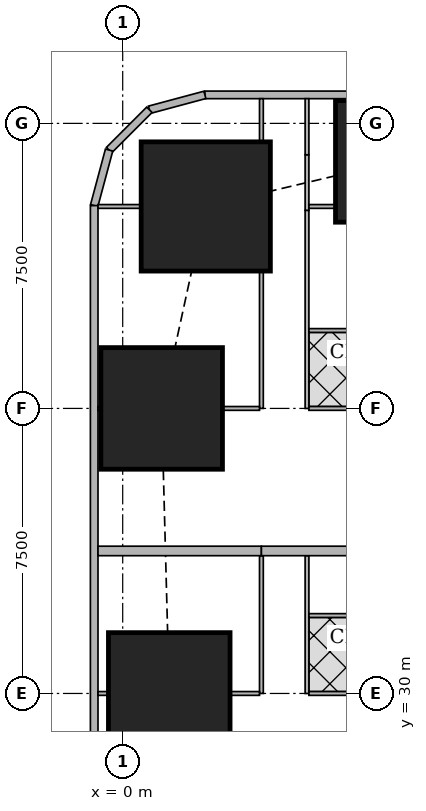
"""IFC4 building model, lengths in metres.
Left out: names, types, materials, properties, quantities, classifications, styles, units other than length and angle.
Written with IfcOpenShell. Run it as: python <this file> out.ifc"""

import sys

from ifc_helpers import new_model, si_unit, direction, frame, frame_2d, origin, origin_2d, place, context, subcontext, project, spatial, rectangle, extrude, element, fill, save


model = new_model("IFC4")
c1 = context("Model", 3, precision=1e-05, world=origin(), true_north=direction((0.0, 1.0)))
c2 = subcontext(c1, "Body", "Model", "MODEL_VIEW")
j1 = project(units=[si_unit("LENGTHUNIT", "METRE"), si_unit("PLANEANGLEUNIT", "RADIAN")], contexts=[c1])
p1 = place(None, origin())
s1 = spatial("IfcSite", under=j1, at=p1, CompositionType="ELEMENT")
p2 = place(p1, origin())
s2 = spatial("IfcBuilding", under=s1, at=p2, CompositionType="ELEMENT")
p3 = place(p2, frame((0.0, 0.0, 20.0)))
s3 = spatial("IfcBuildingStorey", under=s2, at=p3, CompositionType="ELEMENT", Elevation=20.0)
p4 = place(p3, frame((1.225, 30.0, 0.0), z_axis=(0.0, 0.0, 1.0), x_axis=(1.0, 0.0, 0.0)))
e1 = element("IfcColumn", 1, at=p4, inside=s3, PredefinedType="COLUMN", context=c2, shape_type="SweptSolid", body=[
    extrude(rectangle(XDim=3.2, YDim=3.2, at=origin_2d()), origin(), (0.0, 0.0, 1.0), 3.75),
])
p5 = place(p3, frame((1.025, 37.5, -0.3), z_axis=(0.0, 0.0, 1.0), x_axis=(1.0, 0.0, 0.0)))
e2 = element("IfcColumn", 2, at=p5, inside=s3, PredefinedType="COLUMN", context=c2, shape_type="SweptSolid", body=[
    extrude(rectangle(XDim=3.2, YDim=3.2, at=origin_2d()), origin(), (0.0, 0.0, 1.0), 4.05),
])
p6 = place(p3, frame((2.186, 42.814, 0.0), z_axis=(0.0, 0.0, 1.0), x_axis=(1.0, 0.0, 0.0)))
e3 = element("IfcColumn", 3, at=p6, inside=s3, PredefinedType="COLUMN", context=c2, shape_type="SweptSolid", body=[
    extrude(rectangle(XDim=3.4, YDim=3.4, at=origin_2d()), origin(), (0.0, 0.0, 1.0), 3.75),
])
p7 = place(p3, frame((7.2, 44.0, -0.3), z_axis=(0.0, 0.0, 1.0), x_axis=(1.0, 0.0, 0.0)))
e4 = element("IfcColumn", 4, at=p7, inside=s3, PredefinedType="COLUMN", context=c2, shape_type="SweptSolid", body=[
    extrude(rectangle(XDim=3.2, YDim=3.2, at=origin_2d()), origin(), (0.0, 0.0, 1.0), 4.05),
])
p8 = place(p3, frame((40.106, 45.75, 0.0), z_axis=(0.0, 0.0, 1.0), x_axis=(-1.0, 0.0, 0.0)))
e5 = element("IfcWall", 5, at=p8, inside=s3, PredefinedType="SOLIDWALL", context=c2, shape_type="SweptSolid", body=[
    extrude(rectangle(XDim=37.943, YDim=0.2, at=frame_2d((18.971, 0.0))), origin(), (0.0, 0.0, 1.0), 3.5),
])
p9 = place(p8, frame((8.606, 0.0, 0.9)))
e6 = element("IfcOpeningElement", 6, at=p9, cuts=e5, PredefinedType="OPENING", context=c2, shape_type="SweptSolid", body=[
    extrude(rectangle(XDim=1.8, YDim=1.5, at=frame_2d((0.9, 0.75))), frame((0.0, 0.11, 0.0), z_axis=(0.0, -1.0, 0.0), x_axis=(1.0, 0.0, 0.0)), (0.0, 0.0, 1.0), 0.22),
])
p10 = place(p8, frame((12.206, 0.0, 0.9)))
e7 = element("IfcOpeningElement", 7, at=p10, cuts=e5, PredefinedType="OPENING", context=c2, shape_type="SweptSolid", body=[
    extrude(rectangle(XDim=1.8, YDim=1.5, at=frame_2d((0.9, 0.75))), frame((0.0, 0.11, 0.0), z_axis=(0.0, -1.0, 0.0), x_axis=(1.0, 0.0, 0.0)), (0.0, 0.0, 1.0), 0.22),
])
p11 = place(p8, frame((15.806, 0.0, 0.9)))
e8 = element("IfcOpeningElement", 8, at=p11, cuts=e5, PredefinedType="OPENING", context=c2, shape_type="SweptSolid", body=[
    extrude(rectangle(XDim=1.8, YDim=1.5, at=frame_2d((0.9, 0.75))), frame((0.0, 0.11, 0.0), z_axis=(0.0, -1.0, 0.0), x_axis=(1.0, 0.0, 0.0)), (0.0, 0.0, 1.0), 0.22),
])
p12 = place(p8, frame((19.406, 0.0, 0.9)))
e9 = element("IfcOpeningElement", 9, at=p12, cuts=e5, PredefinedType="OPENING", context=c2, shape_type="SweptSolid", body=[
    extrude(rectangle(XDim=1.8, YDim=1.5, at=frame_2d((0.9, 0.75))), frame((0.0, 0.11, 0.0), z_axis=(0.0, -1.0, 0.0), x_axis=(1.0, 0.0, 0.0)), (0.0, 0.0, 1.0), 0.22),
])
p13 = place(p8, frame((23.006, 0.0, 0.9)))
e10 = element("IfcOpeningElement", 10, at=p13, cuts=e5, PredefinedType="OPENING", context=c2, shape_type="SweptSolid", body=[
    extrude(rectangle(XDim=1.8, YDim=1.5, at=frame_2d((0.9, 0.75))), frame((0.0, 0.11, 0.0), z_axis=(0.0, -1.0, 0.0), x_axis=(1.0, 0.0, 0.0)), (0.0, 0.0, 1.0), 0.22),
])
p14 = place(p8, frame((26.606, 0.0, 0.9)))
e11 = element("IfcOpeningElement", 11, at=p14, cuts=e5, PredefinedType="OPENING", context=c2, shape_type="SweptSolid", body=[
    extrude(rectangle(XDim=1.8, YDim=1.5, at=frame_2d((0.9, 0.75))), frame((0.0, 0.11, 0.0), z_axis=(0.0, -1.0, 0.0), x_axis=(1.0, 0.0, 0.0)), (0.0, 0.0, 1.0), 0.22),
])
p15 = place(p3, frame((2.163, 45.75, 0.0), z_axis=(0.0, 0.0, 1.0), x_axis=(-0.965832000415, -0.259168954497, 0.0)))
e12 = element("IfcWall", 12, at=p15, inside=s3, PredefinedType="SOLIDWALL", context=c2, shape_type="SweptSolid", body=[
    extrude(rectangle(XDim=1.513, YDim=0.2, at=frame_2d((0.756, 0.0))), origin(), (0.0, 0.0, 1.0), 3.5),
])
p16 = place(p3, frame((0.702, 45.358, 0.0), z_axis=(0.0, 0.0, 1.0), x_axis=(-0.707106781187, -0.707106781187, 0.0)))
e13 = element("IfcWall", 13, at=p16, inside=s3, PredefinedType="SOLIDWALL", context=c2, shape_type="SweptSolid", body=[
    extrude(rectangle(XDim=1.499, YDim=0.2, at=frame_2d((0.75, 0.0))), origin(), (0.0, 0.0, 1.0), 3.5),
])
p17 = place(p3, frame((-0.358, 44.298, 0.0), z_axis=(0.0, 0.0, 1.0), x_axis=(-0.259168954497, -0.965832000415, 0.0)))
e14 = element("IfcWall", 14, at=p17, inside=s3, PredefinedType="SOLIDWALL", context=c2, shape_type="SweptSolid", body=[
    extrude(rectangle(XDim=1.513, YDim=0.2, at=frame_2d((0.756, 0.0))), origin(), (0.0, 0.0, 1.0), 3.5),
])
p18 = place(p3, frame((-0.75, 42.837, 0.0), z_axis=(0.0, 0.0, 1.0), x_axis=(0.0, -1.0, 0.0)))
e15 = element("IfcWall", 15, at=p18, inside=s3, PredefinedType="SOLIDWALL", context=c2, shape_type="SweptSolid", body=[
    extrude(rectangle(XDim=40.674, YDim=0.2, at=frame_2d((20.337, 0.0))), origin(), (0.0, 0.0, 1.0), 3.5),
])
p19 = place(p18, frame((1.78, 0.0, 0.9)))
e16 = element("IfcOpeningElement", 16, at=p19, cuts=e15, PredefinedType="OPENING", context=c2, shape_type="SweptSolid", body=[
    extrude(rectangle(XDim=1.8, YDim=1.5, at=frame_2d((0.9, 0.75))), frame((0.0, 0.11, 0.0), z_axis=(0.0, -1.0, 0.0), x_axis=(1.0, 0.0, 0.0)), (0.0, 0.0, 1.0), 0.22),
])
p20 = place(p18, frame((6.312, 0.0, 0.9)))
e17 = element("IfcOpeningElement", 17, at=p20, cuts=e15, PredefinedType="OPENING", context=c2, shape_type="SweptSolid", body=[
    extrude(rectangle(XDim=1.8, YDim=1.5, at=frame_2d((0.9, 0.75))), frame((0.0, 0.11, 0.0), z_axis=(0.0, -1.0, 0.0), x_axis=(1.0, 0.0, 0.0)), (0.0, 0.0, 1.0), 0.22),
])
p21 = place(p18, frame((10.062, 0.0, 0.9)))
e18 = element("IfcOpeningElement", 18, at=p21, cuts=e15, PredefinedType="OPENING", context=c2, shape_type="SweptSolid", body=[
    extrude(rectangle(XDim=1.8, YDim=1.5, at=frame_2d((0.9, 0.75))), frame((0.0, 0.11, 0.0), z_axis=(0.0, -1.0, 0.0), x_axis=(1.0, 0.0, 0.0)), (0.0, 0.0, 1.0), 0.22),
])
p22 = place(p18, frame((13.812, 0.0, 0.9)))
e19 = element("IfcOpeningElement", 19, at=p22, cuts=e15, PredefinedType="OPENING", context=c2, shape_type="SweptSolid", body=[
    extrude(rectangle(XDim=1.8, YDim=1.5, at=frame_2d((0.9, 0.75))), frame((0.0, 0.11, 0.0), z_axis=(0.0, -1.0, 0.0), x_axis=(1.0, 0.0, 0.0)), (0.0, 0.0, 1.0), 0.22),
])
p23 = place(p18, frame((17.562, 0.0, 0.9)))
e20 = element("IfcOpeningElement", 20, at=p23, cuts=e15, PredefinedType="OPENING", context=c2, shape_type="SweptSolid", body=[
    extrude(rectangle(XDim=1.8, YDim=1.5, at=frame_2d((0.9, 0.75))), frame((0.0, 0.11, 0.0), z_axis=(0.0, -1.0, 0.0), x_axis=(1.0, 0.0, 0.0)), (0.0, 0.0, 1.0), 0.22),
])
p24 = place(p18, frame((21.312, 0.0, 0.9)))
e21 = element("IfcOpeningElement", 21, at=p24, cuts=e15, PredefinedType="OPENING", context=c2, shape_type="SweptSolid", body=[
    extrude(rectangle(XDim=1.8, YDim=1.5, at=frame_2d((0.9, 0.75))), frame((0.0, 0.11, 0.0), z_axis=(0.0, -1.0, 0.0), x_axis=(1.0, 0.0, 0.0)), (0.0, 0.0, 1.0), 0.22),
])
p25 = place(p18, frame((25.062, 0.0, 0.9)))
e22 = element("IfcOpeningElement", 22, at=p25, cuts=e15, PredefinedType="OPENING", context=c2, shape_type="SweptSolid", body=[
    extrude(rectangle(XDim=1.8, YDim=1.5, at=frame_2d((0.9, 0.75))), frame((0.0, 0.11, 0.0), z_axis=(0.0, -1.0, 0.0), x_axis=(1.0, 0.0, 0.0)), (0.0, 0.0, 1.0), 0.22),
])
p26 = place(p18, frame((28.812, 0.0, 0.9)))
e23 = element("IfcOpeningElement", 23, at=p26, cuts=e15, PredefinedType="OPENING", context=c2, shape_type="SweptSolid", body=[
    extrude(rectangle(XDim=1.8, YDim=1.5, at=frame_2d((0.9, 0.75))), frame((0.0, 0.11, 0.0), z_axis=(0.0, -1.0, 0.0), x_axis=(1.0, 0.0, 0.0)), (0.0, 0.0, 1.0), 0.22),
])
p27 = place(p18, frame((32.562, 0.0, 0.9)))
e24 = element("IfcOpeningElement", 24, at=p27, cuts=e15, PredefinedType="OPENING", context=c2, shape_type="SweptSolid", body=[
    extrude(rectangle(XDim=1.8, YDim=1.5, at=frame_2d((0.9, 0.75))), frame((0.0, 0.11, 0.0), z_axis=(0.0, -1.0, 0.0), x_axis=(1.0, 0.0, 0.0)), (0.0, 0.0, 1.0), 0.22),
])
p28 = place(p18, frame((37.094, 0.0, 0.9)))
e25 = element("IfcOpeningElement", 25, at=p28, cuts=e15, PredefinedType="OPENING", context=c2, shape_type="SweptSolid", body=[
    extrude(rectangle(XDim=1.8, YDim=1.5, at=frame_2d((0.9, 0.75))), frame((0.0, 0.11, 0.0), z_axis=(0.0, -1.0, 0.0), x_axis=(1.0, 0.0, 0.0)), (0.0, 0.0, 1.0), 0.22),
])
p29 = place(p3, frame((3.65, 30.0, 0.0), z_axis=(0.0, 0.0, 1.0), x_axis=(0.0, 1.0, 0.0)))
e26 = element("IfcWall", 26, at=p29, inside=s3, PredefinedType="PARTITIONING", context=c2, shape_type="SweptSolid", body=[
    extrude(rectangle(XDim=3.625, YDim=0.1, at=frame_2d((1.812, 0.0))), origin(), (0.0, 0.0, 1.0), 3.5),
])
p30 = place(p29, frame((1.65, 0.0, 0.0)))
e27 = element("IfcOpeningElement", 27, at=p30, cuts=e26, PredefinedType="OPENING", context=c2, shape_type="SweptSolid", body=[
    extrude(rectangle(XDim=0.9, YDim=2.1, at=frame_2d((0.45, 1.05))), frame((0.0, 0.06, 0.0), z_axis=(0.0, -1.0, 0.0), x_axis=(1.0, 0.0, 0.0)), (0.0, 0.0, 1.0), 0.12),
])
p31 = place(p3, frame((4.85, 30.0, 0.0), z_axis=(0.0, 0.0, 1.0), x_axis=(0.0, 1.0, 0.0)))
e28 = element("IfcWall", 28, at=p31, inside=s3, PredefinedType="PARTITIONING", context=c2, shape_type="SweptSolid", body=[
    extrude(rectangle(XDim=3.625, YDim=0.1, at=frame_2d((1.812, 0.0))), origin(), (0.0, 0.0, 1.0), 3.5),
])
p32 = place(p31, frame((0.575, 0.0, 0.0)))
e29 = element("IfcOpeningElement", 29, at=p32, cuts=e28, PredefinedType="OPENING", context=c2, shape_type="SweptSolid", body=[
    extrude(rectangle(XDim=0.9, YDim=2.1, at=frame_2d((0.45, 1.05))), frame((0.0, 0.06, 0.0), z_axis=(0.0, -1.0, 0.0), x_axis=(1.0, 0.0, 0.0)), (0.0, 0.0, 1.0), 0.12),
])
p33 = place(p31, frame((2.45, 0.0, 0.0)))
e30 = element("IfcOpeningElement", 30, at=p33, cuts=e28, PredefinedType="OPENING", context=c2, shape_type="SweptSolid", body=[
    extrude(rectangle(XDim=0.9, YDim=2.1, at=frame_2d((0.45, 1.05))), frame((0.0, 0.06, 0.0), z_axis=(0.0, -1.0, 0.0), x_axis=(1.0, 0.0, 0.0)), (0.0, 0.0, 1.0), 0.12),
])
p34 = place(p3, frame((-0.65, 30.0, 0.0), z_axis=(0.0, 0.0, 1.0), x_axis=(1.0, 0.0, 0.0)))
e31 = element("IfcWall", 31, at=p34, inside=s3, PredefinedType="PARTITIONING", context=c2, shape_type="SweptSolid", body=[
    extrude(rectangle(XDim=0.274, YDim=0.1, at=frame_2d((0.137, 0.0))), origin(), (0.0, 0.0, 1.0), 3.5),
])
p35 = place(p3, frame((2.826, 30.0, 0.0), z_axis=(0.0, 0.0, 1.0), x_axis=(1.0, 0.0, 0.0)))
e32 = element("IfcWall", 32, at=p35, inside=s3, PredefinedType="PARTITIONING", context=c2, shape_type="SweptSolid", body=[
    extrude(rectangle(XDim=0.774, YDim=0.1, at=frame_2d((0.387, 0.0))), origin(), (0.0, 0.0, 1.0), 3.5),
])
p36 = place(p3, frame((4.9, 30.0, 0.0), z_axis=(0.0, 0.0, 1.0), x_axis=(1.0, 0.0, 0.0)))
e33 = element("IfcWall", 33, at=p36, inside=s3, PredefinedType="PARTITIONING", context=c2, shape_type="SweptSolid", body=[
    extrude(rectangle(XDim=1.399, YDim=0.1, at=frame_2d((0.7, 0.0))), origin(), (0.0, 0.0, 1.0), 3.5),
])
p37 = place(p3, frame((4.9, 32.05, 0.0), z_axis=(0.0, 0.0, 1.0), x_axis=(1.0, 0.0, 0.0)))
e34 = element("IfcWall", 34, at=p37, inside=s3, PredefinedType="PARTITIONING", context=c2, shape_type="SweptSolid", body=[
    extrude(rectangle(XDim=3.525, YDim=0.1, at=frame_2d((1.763, 0.0))), origin(), (0.0, 0.0, 1.0), 3.5),
])
p38 = place(p3, frame((3.65, 37.5, 0.0), z_axis=(0.0, 0.0, 1.0), x_axis=(0.0, 1.0, 0.0)))
e35 = element("IfcWall", 35, at=p38, inside=s3, PredefinedType="PARTITIONING", context=c2, shape_type="SweptSolid", body=[
    extrude(rectangle(XDim=3.613, YDim=0.1, at=frame_2d((1.807, 0.0))), origin(), (0.0, 0.0, 1.0), 3.5),
])
p39 = place(p38, frame((1.65, 0.0, 0.0)))
e36 = element("IfcOpeningElement", 36, at=p39, cuts=e35, PredefinedType="OPENING", context=c2, shape_type="SweptSolid", body=[
    extrude(rectangle(XDim=0.9, YDim=2.1, at=frame_2d((0.45, 1.05))), frame((0.0, 0.06, 0.0), z_axis=(0.0, -1.0, 0.0), x_axis=(1.0, 0.0, 0.0)), (0.0, 0.0, 1.0), 0.12),
])
p40 = place(p3, frame((3.65, 44.515, 0.0), z_axis=(0.0, 0.0, 1.0), x_axis=(0.0, 1.0, 0.0)))
e37 = element("IfcWall", 37, at=p40, inside=s3, PredefinedType="PARTITIONING", context=c2, shape_type="SweptSolid", body=[
    extrude(rectangle(XDim=1.135, YDim=0.1, at=frame_2d((0.567, 0.0))), origin(), (0.0, 0.0, 1.0), 3.5),
])
p41 = place(p3, frame((4.85, 37.5, 0.0), z_axis=(0.0, 0.0, 1.0), x_axis=(0.0, 1.0, 0.0)))
e38 = element("IfcWall", 38, at=p41, inside=s3, PredefinedType="PARTITIONING", context=c2, shape_type="SweptSolid", body=[
    extrude(rectangle(XDim=5.213, YDim=0.1, at=frame_2d((2.606, 0.0))), origin(), (0.0, 0.0, 1.0), 3.5),
])
p42 = place(p41, frame((0.575, 0.0, 0.0)))
e39 = element("IfcOpeningElement", 39, at=p42, cuts=e38, PredefinedType="OPENING", context=c2, shape_type="SweptSolid", body=[
    extrude(rectangle(XDim=0.9, YDim=2.1, at=frame_2d((0.45, 1.05))), frame((0.0, 0.06, 0.0), z_axis=(0.0, -1.0, 0.0), x_axis=(1.0, 0.0, 0.0)), (0.0, 0.0, 1.0), 0.12),
])
p43 = place(p41, frame((2.85, 0.0, 0.0)))
e40 = element("IfcOpeningElement", 40, at=p43, cuts=e38, PredefinedType="OPENING", context=c2, shape_type="SweptSolid", body=[
    extrude(rectangle(XDim=0.9, YDim=2.1, at=frame_2d((0.45, 1.05))), frame((0.0, 0.06, 0.0), z_axis=(0.0, -1.0, 0.0), x_axis=(1.0, 0.0, 0.0)), (0.0, 0.0, 1.0), 0.12),
])
p44 = place(p3, frame((4.85, 42.713, 0.0), z_axis=(0.0, 0.0, 1.0), x_axis=(0.0, 1.0, 0.0)))
e41 = element("IfcWall", 41, at=p44, inside=s3, PredefinedType="PARTITIONING", context=c2, shape_type="SweptSolid", body=[
    extrude(rectangle(XDim=1.462, YDim=0.1, at=frame_2d((0.731, 0.0))), origin(), (0.0, 0.0, 1.0), 2.1),
])
p45 = place(p3, frame((4.85, 44.175, 0.0), z_axis=(0.0, 0.0, 1.0), x_axis=(0.0, 1.0, 0.0)))
e42 = element("IfcWall", 42, at=p45, inside=s3, PredefinedType="PARTITIONING", context=c2, shape_type="SweptSolid", body=[
    extrude(rectangle(XDim=1.475, YDim=0.1, at=frame_2d((0.737, 0.0))), origin(), (0.0, 0.0, 1.0), 3.5),
])
p46 = place(p3, frame((-0.65, 37.5, 0.0), z_axis=(0.0, 0.0, 1.0), x_axis=(1.0, 0.0, 0.0)))
e43 = element("IfcWall", 43, at=p46, inside=s3, PredefinedType="PARTITIONING", context=c2, shape_type="SweptSolid", body=[
    extrude(rectangle(XDim=0.074, YDim=0.1, at=frame_2d((0.037, 0.0))), origin(), (0.0, 0.0, 1.0), 3.5),
])
p47 = place(p3, frame((2.626, 37.5, 0.0), z_axis=(0.0, 0.0, 1.0), x_axis=(1.0, 0.0, 0.0)))
e44 = element("IfcWall", 44, at=p47, inside=s3, PredefinedType="PARTITIONING", context=c2, shape_type="SweptSolid", body=[
    extrude(rectangle(XDim=0.974, YDim=0.1, at=frame_2d((0.487, 0.0))), origin(), (0.0, 0.0, 1.0), 3.5),
])
p48 = place(p3, frame((-0.65, 42.814, 0.0), z_axis=(0.0, 0.0, 1.0), x_axis=(1.0, 0.0, 0.0)))
e45 = element("IfcWall", 45, at=p48, inside=s3, PredefinedType="PARTITIONING", context=c2, shape_type="SweptSolid", body=[
    extrude(rectangle(XDim=1.135, YDim=0.1, at=frame_2d((0.567, 0.0))), origin(), (0.0, 0.0, 1.0), 3.5),
])
p49 = place(p3, frame((4.9, 37.5, 0.0), z_axis=(0.0, 0.0, 1.0), x_axis=(1.0, 0.0, 0.0)))
e46 = element("IfcWall", 46, at=p49, inside=s3, PredefinedType="PARTITIONING", context=c2, shape_type="SweptSolid", body=[
    extrude(rectangle(XDim=1.399, YDim=0.1, at=frame_2d((0.7, 0.0))), origin(), (0.0, 0.0, 1.0), 3.5),
])
p50 = place(p3, frame((4.9, 42.814, 0.0), z_axis=(0.0, 0.0, 1.0), x_axis=(1.0, 0.0, 0.0)))
e47 = element("IfcWall", 47, at=p50, inside=s3, PredefinedType="PARTITIONING", context=c2, shape_type="SweptSolid", body=[
    extrude(rectangle(XDim=0.699, YDim=0.1, at=frame_2d((0.35, 0.0))), origin(), (0.0, 0.0, 1.0), 2.1),
])
p51 = place(p3, frame((4.9, 39.55, 0.0), z_axis=(0.0, 0.0, 1.0), x_axis=(1.0, 0.0, 0.0)))
e48 = element("IfcWall", 48, at=p51, inside=s3, PredefinedType="PARTITIONING", context=c2, shape_type="SweptSolid", body=[
    extrude(rectangle(XDim=3.525, YDim=0.1, at=frame_2d((1.763, 0.0))), origin(), (0.0, 0.0, 1.0), 3.5),
])
p52 = place(p3, frame((-0.65, 33.75, 0.0), z_axis=(0.0, 0.0, 1.0), x_axis=(1.0, 0.0, 0.0)))
e49 = element("IfcWall", 49, at=p52, inside=s3, PredefinedType="SOLIDWALL", context=c2, shape_type="SweptSolid", body=[
    extrude(rectangle(XDim=4.3, YDim=0.25, at=frame_2d((2.15, 0.0))), origin(), (0.0, 0.0, 1.0), 2.05),
])
p53 = place(p3, frame((3.65, 33.75, 0.0), z_axis=(0.0, 0.0, 1.0), x_axis=(1.0, 0.0, 0.0)))
e50 = element("IfcWall", 50, at=p53, inside=s3, PredefinedType="SOLIDWALL", context=c2, shape_type="SweptSolid", body=[
    extrude(rectangle(XDim=4.775, YDim=0.25, at=frame_2d((2.388, 0.0))), origin(), (0.0, 0.0, 1.0), 3.5),
])
p54 = place(p19, origin())
e51 = element("IfcWindow", 51, at=p54, inside=s3, PartitioningType="SINGLE_PANEL", PredefinedType="WINDOW", context=c2, shape_type="SweptSolid", body=[
    extrude(rectangle(XDim=1.8, YDim=1.5, at=frame_2d((0.9, 0.75))), frame((0.0, 0.03, 0.0), z_axis=(0.0, -1.0, 0.0), x_axis=(1.0, 0.0, 0.0)), (0.0, 0.0, 1.0), 0.06),
])
fill(e16, e51)
p55 = place(p20, origin())
e52 = element("IfcWindow", 52, at=p55, inside=s3, PartitioningType="SINGLE_PANEL", PredefinedType="WINDOW", context=c2, shape_type="SweptSolid", body=[
    extrude(rectangle(XDim=1.8, YDim=1.5, at=frame_2d((0.9, 0.75))), frame((0.0, 0.03, 0.0), z_axis=(0.0, -1.0, 0.0), x_axis=(1.0, 0.0, 0.0)), (0.0, 0.0, 1.0), 0.06),
])
fill(e17, e52)
p56 = place(p21, origin())
e53 = element("IfcWindow", 53, at=p56, inside=s3, PartitioningType="SINGLE_PANEL", PredefinedType="WINDOW", context=c2, shape_type="SweptSolid", body=[
    extrude(rectangle(XDim=1.8, YDim=1.5, at=frame_2d((0.9, 0.75))), frame((0.0, 0.03, 0.0), z_axis=(0.0, -1.0, 0.0), x_axis=(1.0, 0.0, 0.0)), (0.0, 0.0, 1.0), 0.06),
])
fill(e18, e53)
p57 = place(p22, origin())
e54 = element("IfcWindow", 54, at=p57, inside=s3, PartitioningType="SINGLE_PANEL", PredefinedType="WINDOW", context=c2, shape_type="SweptSolid", body=[
    extrude(rectangle(XDim=1.8, YDim=1.5, at=frame_2d((0.9, 0.75))), frame((0.0, 0.03, 0.0), z_axis=(0.0, -1.0, 0.0), x_axis=(1.0, 0.0, 0.0)), (0.0, 0.0, 1.0), 0.06),
])
fill(e19, e54)
p58 = place(p30, origin())
e55 = element("IfcDoor", 55, at=p58, inside=s3, OperationType="SINGLE_SWING_RIGHT", PredefinedType="DOOR", context=c2, shape_type="SweptSolid", body=[
    extrude(rectangle(XDim=0.9, YDim=2.1, at=frame_2d((0.45, 1.05))), frame((0.0, 0.025, 0.0), z_axis=(0.0, -1.0, 0.0), x_axis=(1.0, 0.0, 0.0)), (0.0, 0.0, 1.0), 0.05),
])
fill(e27, e55)
p59 = place(p32, origin())
e56 = element("IfcDoor", 56, at=p59, inside=s3, OperationType="SINGLE_SWING_RIGHT", PredefinedType="DOOR", context=c2, shape_type="SweptSolid", body=[
    extrude(rectangle(XDim=0.9, YDim=2.1, at=frame_2d((0.45, 1.05))), frame((0.0, 0.025, 0.0), z_axis=(0.0, -1.0, 0.0), x_axis=(1.0, 0.0, 0.0)), (0.0, 0.0, 1.0), 0.05),
])
fill(e29, e56)
p60 = place(p33, origin())
e57 = element("IfcDoor", 57, at=p60, inside=s3, OperationType="SINGLE_SWING_LEFT", PredefinedType="DOOR", context=c2, shape_type="SweptSolid", body=[
    extrude(rectangle(XDim=0.9, YDim=2.1, at=frame_2d((0.45, 1.05))), frame((0.0, 0.025, 0.0), z_axis=(0.0, -1.0, 0.0), x_axis=(1.0, 0.0, 0.0)), (0.0, 0.0, 1.0), 0.05),
])
fill(e30, e57)
p61 = place(p39, origin())
e58 = element("IfcDoor", 58, at=p61, inside=s3, OperationType="SINGLE_SWING_RIGHT", PredefinedType="DOOR", context=c2, shape_type="SweptSolid", body=[
    extrude(rectangle(XDim=0.9, YDim=2.1, at=frame_2d((0.45, 1.05))), frame((0.0, 0.025, 0.0), z_axis=(0.0, -1.0, 0.0), x_axis=(1.0, 0.0, 0.0)), (0.0, 0.0, 1.0), 0.05),
])
fill(e36, e58)
p62 = place(p42, origin())
e59 = element("IfcDoor", 59, at=p62, inside=s3, OperationType="SINGLE_SWING_RIGHT", PredefinedType="DOOR", context=c2, shape_type="SweptSolid", body=[
    extrude(rectangle(XDim=0.9, YDim=2.1, at=frame_2d((0.45, 1.05))), frame((0.0, 0.025, 0.0), z_axis=(0.0, -1.0, 0.0), x_axis=(1.0, 0.0, 0.0)), (0.0, 0.0, 1.0), 0.05),
])
fill(e39, e59)
p63 = place(p43, origin())
e60 = element("IfcDoor", 60, at=p63, inside=s3, OperationType="SINGLE_SWING_RIGHT", PredefinedType="DOOR", context=c2, shape_type="SweptSolid", body=[
    extrude(rectangle(XDim=0.9, YDim=2.1, at=frame_2d((0.45, 1.05))), frame((0.0, 0.025, 0.0), z_axis=(0.0, -1.0, 0.0), x_axis=(1.0, 0.0, 0.0)), (0.0, 0.0, 1.0), 0.05),
])
fill(e40, e60)
save(model, sys.argv[1])
